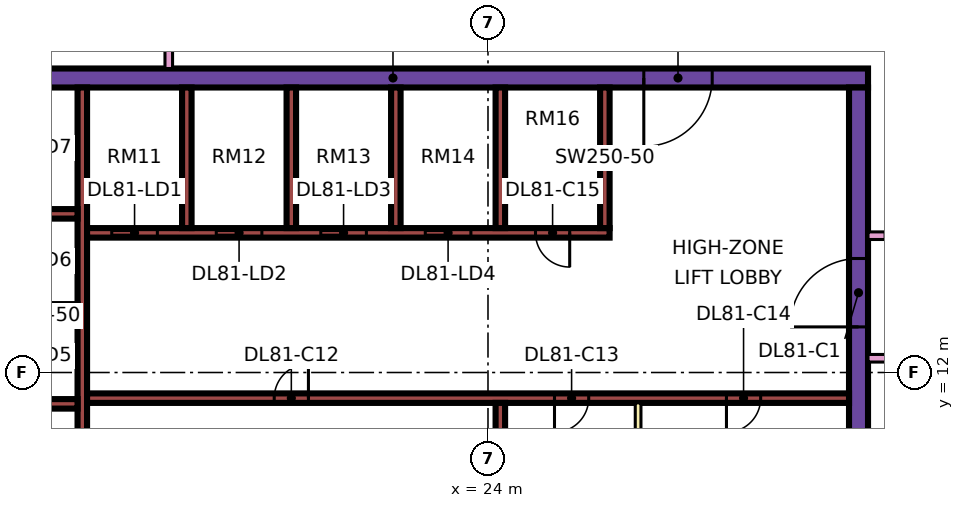
"""IFC4 building model, lengths in metres.
Left out: names, types, materials, properties, quantities, classifications, styles, units other than length and angle.
Written with IfcOpenShell. Run it as: python <this file> out.ifc"""

import sys

from ifc_helpers import new_model, si_unit, direction, frame, frame_2d, origin, place, context, subcontext, project, spatial, rectangle, extrude, element, fill, save


model = new_model("IFC4")
c1 = context("Model", 3, precision=1e-05, world=origin(), true_north=direction((0.0, 1.0)))
c2 = subcontext(c1, "Body", "Model", "MODEL_VIEW")
j1 = project(units=[si_unit("LENGTHUNIT", "METRE"), si_unit("PLANEANGLEUNIT", "RADIAN")], contexts=[c1])
p1 = place(None, origin())
s1 = spatial("IfcSite", under=j1, at=p1, CompositionType="ELEMENT")
p2 = place(p1, origin())
s2 = spatial("IfcBuilding", under=s1, at=p2, CompositionType="ELEMENT")
p3 = place(p2, frame((0.0, 0.0, 350.15)))
s3 = spatial("IfcBuildingStorey", under=s2, at=p3, CompositionType="ELEMENT", Elevation=350.15)
p4 = place(p3, frame((9.0, 19.75, 0.0), z_axis=(0.0, 0.0, 1.0), x_axis=(1.0, 0.0, 0.0)))
e1 = element("IfcWall", 1, at=p4, inside=s3, PredefinedType="SHEAR", context=c2, shape_type="SweptSolid", body=[
    extrude(rectangle(XDim=25.0, YDim=0.5, at=frame_2d((12.5, 0.0))), origin(), (0.0, 0.0, 1.0), 3.75),
])
p5 = place(p4, frame((19.1, 0.0, 0.0)))
e2 = element("IfcOpeningElement", 2, at=p5, cuts=e1, PredefinedType="OPENING", context=c2, shape_type="SweptSolid", body=[
    extrude(rectangle(XDim=1.8, YDim=2.4, at=frame_2d((0.9, 1.2))), frame((0.0, 0.26, 0.0), z_axis=(0.0, -1.0, 0.0), x_axis=(1.0, 0.0, 0.0)), (0.0, 0.0, 1.0), 0.52),
])
p6 = place(p3, frame((33.75, 7.5, 0.0), z_axis=(0.0, 0.0, 1.0), x_axis=(0.0, 1.0, 0.0)))
e3 = element("IfcWall", 3, at=p6, inside=s3, PredefinedType="SHEAR", context=c2, shape_type="SweptSolid", body=[
    extrude(rectangle(XDim=12.0, YDim=0.5, at=frame_2d((6.0, 0.0))), origin(), (0.0, 0.0, 1.0), 3.75),
])
p7 = place(p6, frame((5.7, 0.0, 0.0)))
e4 = element("IfcOpeningElement", 4, at=p7, cuts=e3, PredefinedType="OPENING", context=c2, shape_type="SweptSolid", body=[
    extrude(rectangle(XDim=1.8, YDim=2.4, at=frame_2d((0.9, 1.2))), frame((0.0, 0.26, 0.0), z_axis=(0.0, -1.0, 0.0), x_axis=(1.0, 0.0, 0.0)), (0.0, 0.0, 1.0), 0.52),
])
p8 = place(p3, frame((13.325, 7.5, 0.0), z_axis=(0.0, 0.0, 1.0), x_axis=(0.0, 1.0, 0.0)))
e5 = element("IfcWall", 5, at=p8, inside=s3, PredefinedType="SHEAR", context=c2, shape_type="SweptSolid", body=[
    extrude(rectangle(XDim=12.0, YDim=0.25, at=frame_2d((6.0, 0.0))), origin(), (0.0, 0.0, 1.0), 3.75),
])
p9 = place(p3, frame((13.45, 11.325, 0.0), z_axis=(0.0, 0.0, 1.0), x_axis=(1.0, 0.0, 0.0)))
e6 = element("IfcWall", 6, at=p9, inside=s3, PredefinedType="SHEAR", context=c2, shape_type="SweptSolid", body=[
    extrude(rectangle(XDim=20.05, YDim=0.25, at=frame_2d((10.025, 0.0))), origin(), (0.0, 0.0, 1.0), 3.75),
])
p10 = place(p9, frame((4.925, 0.0, 0.0)))
e7 = element("IfcOpeningElement", 7, at=p10, cuts=e6, PredefinedType="OPENING", context=c2, shape_type="SweptSolid", body=[
    extrude(rectangle(XDim=0.9, YDim=2.1, at=frame_2d((0.45, 1.05))), frame((0.0, 0.135, 0.0), z_axis=(0.0, -1.0, 0.0), x_axis=(1.0, 0.0, 0.0)), (0.0, 0.0, 1.0), 0.27),
])
p11 = place(p9, frame((12.3, 0.0, 0.0)))
e8 = element("IfcOpeningElement", 8, at=p11, cuts=e6, PredefinedType="OPENING", context=c2, shape_type="SweptSolid", body=[
    extrude(rectangle(XDim=0.9, YDim=2.1, at=frame_2d((0.45, 1.05))), frame((0.0, 0.135, 0.0), z_axis=(0.0, -1.0, 0.0), x_axis=(1.0, 0.0, 0.0)), (0.0, 0.0, 1.0), 0.27),
])
p12 = place(p9, frame((16.825, 0.0, 0.0)))
e9 = element("IfcOpeningElement", 9, at=p12, cuts=e6, PredefinedType="OPENING", context=c2, shape_type="SweptSolid", body=[
    extrude(rectangle(XDim=0.9, YDim=2.1, at=frame_2d((0.45, 1.05))), frame((0.0, 0.135, 0.0), z_axis=(0.0, -1.0, 0.0), x_axis=(1.0, 0.0, 0.0)), (0.0, 0.0, 1.0), 0.27),
])
p13 = place(p3, frame((13.45, 15.675, 0.0), z_axis=(0.0, 0.0, 1.0), x_axis=(1.0, 0.0, 0.0)))
e10 = element("IfcWall", 10, at=p13, inside=s3, PredefinedType="SHEAR", context=c2, shape_type="SweptSolid", body=[
    extrude(rectangle(XDim=13.75, YDim=0.25, at=frame_2d((6.875, 0.0))), origin(), (0.0, 0.0, 1.0), 3.75),
])
p14 = place(p13, frame((0.65, 0.0, 0.0)))
e11 = element("IfcOpeningElement", 11, at=p14, cuts=e10, PredefinedType="OPENING", context=c2, shape_type="SweptSolid", body=[
    extrude(rectangle(XDim=1.2, YDim=2.2, at=frame_2d((0.6, 1.1))), frame((0.0, 0.135, 0.0), z_axis=(0.0, -1.0, 0.0), x_axis=(1.0, 0.0, 0.0)), (0.0, 0.0, 1.0), 0.27),
])
p15 = place(p13, frame((3.4, 0.0, 0.0)))
e12 = element("IfcOpeningElement", 12, at=p15, cuts=e10, PredefinedType="OPENING", context=c2, shape_type="SweptSolid", body=[
    extrude(rectangle(XDim=1.2, YDim=2.2, at=frame_2d((0.6, 1.1))), frame((0.0, 0.135, 0.0), z_axis=(0.0, -1.0, 0.0), x_axis=(1.0, 0.0, 0.0)), (0.0, 0.0, 1.0), 0.27),
])
p16 = place(p13, frame((6.15, 0.0, 0.0)))
e13 = element("IfcOpeningElement", 13, at=p16, cuts=e10, PredefinedType="OPENING", context=c2, shape_type="SweptSolid", body=[
    extrude(rectangle(XDim=1.2, YDim=2.2, at=frame_2d((0.6, 1.1))), frame((0.0, 0.135, 0.0), z_axis=(0.0, -1.0, 0.0), x_axis=(1.0, 0.0, 0.0)), (0.0, 0.0, 1.0), 0.27),
])
p17 = place(p13, frame((8.9, 0.0, 0.0)))
e14 = element("IfcOpeningElement", 14, at=p17, cuts=e10, PredefinedType="OPENING", context=c2, shape_type="SweptSolid", body=[
    extrude(rectangle(XDim=1.2, YDim=2.2, at=frame_2d((0.6, 1.1))), frame((0.0, 0.135, 0.0), z_axis=(0.0, -1.0, 0.0), x_axis=(1.0, 0.0, 0.0)), (0.0, 0.0, 1.0), 0.27),
])
p18 = place(p13, frame((11.8, 0.0, 0.0)))
e15 = element("IfcOpeningElement", 15, at=p18, cuts=e10, PredefinedType="OPENING", context=c2, shape_type="SweptSolid", body=[
    extrude(rectangle(XDim=0.9, YDim=2.1, at=frame_2d((0.45, 1.05))), frame((0.0, 0.135, 0.0), z_axis=(0.0, -1.0, 0.0), x_axis=(1.0, 0.0, 0.0)), (0.0, 0.0, 1.0), 0.27),
])
for number, where, z_axis, x_axis in (
    (16, (10.2, 11.175, 0.0), (0.0, 0.0, 1.0), (1.0, 0.0, 0.0)),
    (17, (10.2, 13.675, 0.0), (0.0, 0.0, 1.0), (1.0, 0.0, 0.0)),
    (18, (10.2, 16.175, 0.0), (0.0, 0.0, 1.0), (1.0, 0.0, 0.0)),
):
    element("IfcWall", number, at=place(p3, frame(where, z_axis=z_axis, x_axis=x_axis)), inside=s3, PredefinedType="SHEAR", context=c2, shape_type="SweptSolid", body=[
        extrude(rectangle(XDim=3.0, YDim=0.25, at=frame_2d((1.5, 0.0))), origin(), (0.0, 0.0, 1.0), 3.75),
    ])
for number, where, z_axis, x_axis in (
    (19, (24.325, 7.5, 0.0), (0.0, 0.0, 1.0), (0.0, 1.0, 0.0)),
    (20, (16.075, 15.8, 0.0), (0.0, 0.0, 1.0), (0.0, 1.0, 0.0)),
    (21, (18.825, 15.8, 0.0), (0.0, 0.0, 1.0), (0.0, 1.0, 0.0)),
    (22, (21.575, 15.8, 0.0), (0.0, 0.0, 1.0), (0.0, 1.0, 0.0)),
    (23, (24.325, 15.8, 0.0), (0.0, 0.0, 1.0), (0.0, 1.0, 0.0)),
    (24, (27.075, 15.8, 0.0), (0.0, 0.0, 1.0), (0.0, 1.0, 0.0)),
):
    element("IfcWall", number, at=place(p3, frame(where, z_axis=z_axis, x_axis=x_axis)), inside=s3, PredefinedType="SHEAR", context=c2, shape_type="SweptSolid", body=[
        extrude(rectangle(XDim=3.7, YDim=0.25, at=frame_2d((1.85, 0.0))), origin(), (0.0, 0.0, 1.0), 3.75),
    ])
p19 = place(p3, frame((-1.447, 12.553, 0.0), z_axis=(0.0, 0.0, 1.0), x_axis=(0.707106781187, -0.707106781187, 0.0)))
e25 = element("IfcWall", 25, at=p19, inside=s3, PredefinedType="SOLIDWALL", context=c2, shape_type="SweptSolid", body=[
    extrude(rectangle(XDim=19.799, YDim=0.15, at=frame_2d((9.899, 0.0))), origin(), (0.0, 0.0, 1.0), 3.35),
])
p20 = place(p19, frame((2.212, 0.0, 0.45)))
e26 = element("IfcOpeningElement", 26, at=p20, cuts=e25, PredefinedType="OPENING", context=c2, shape_type="SweptSolid", body=[
    extrude(rectangle(XDim=3.0, YDim=2.4, at=frame_2d((1.5, 1.2))), frame((0.0, 0.085, 0.0), z_axis=(0.0, -1.0, 0.0), x_axis=(1.0, 0.0, 0.0)), (0.0, 0.0, 1.0), 0.17),
])
p21 = place(p19, frame((10.216, 0.0, 0.45)))
e27 = element("IfcOpeningElement", 27, at=p21, cuts=e25, PredefinedType="OPENING", context=c2, shape_type="SweptSolid", body=[
    extrude(rectangle(XDim=3.0, YDim=2.4, at=frame_2d((1.5, 1.2))), frame((0.0, 0.085, 0.0), z_axis=(0.0, -1.0, 0.0), x_axis=(1.0, 0.0, 0.0)), (0.0, 0.0, 1.0), 0.17),
])
p22 = place(p3, frame((27.95, 7.5, 0.0), z_axis=(0.0, 0.0, 1.0), x_axis=(0.0, 1.0, 0.0)))
e28 = element("IfcWall", 28, at=p22, inside=s3, PredefinedType="PARTITIONING", context=c2, shape_type="SweptSolid", body=[
    extrude(rectangle(XDim=3.7, YDim=0.15, at=frame_2d((1.85, 0.0))), origin(), (0.0, 0.0, 1.0), 3.35),
])
p23 = place(p3, frame((15.6, 20.0, 0.0), z_axis=(0.0, 0.0, 1.0), x_axis=(0.0, 1.0, 0.0)))
e29 = element("IfcWall", 29, at=p23, inside=s3, PredefinedType="PARTITIONING", context=c2, shape_type="SweptSolid", body=[
    extrude(rectangle(XDim=27.775, YDim=0.2, at=frame_2d((13.887, 0.0))), origin(), (0.0, 0.0, 1.0), 3.35),
])
p24 = place(p23, frame((6.7, 0.0, 0.0)))
e30 = element("IfcOpeningElement", 30, at=p24, cuts=e29, PredefinedType="OPENING", context=c2, shape_type="SweptSolid", body=[
    extrude(rectangle(XDim=1.6, YDim=2.1, at=frame_2d((0.8, 1.05))), frame((0.0, 0.11, 0.0), z_axis=(0.0, -1.0, 0.0), x_axis=(1.0, 0.0, 0.0)), (0.0, 0.0, 1.0), 0.22),
])
p25 = place(p23, frame((12.95, 0.0, 0.0)))
e31 = element("IfcOpeningElement", 31, at=p25, cuts=e29, PredefinedType="OPENING", context=c2, shape_type="SweptSolid", body=[
    extrude(rectangle(XDim=1.0, YDim=2.1, at=frame_2d((0.5, 1.05))), frame((0.0, 0.11, 0.0), z_axis=(0.0, -1.0, 0.0), x_axis=(1.0, 0.0, 0.0)), (0.0, 0.0, 1.0), 0.22),
])
p26 = place(p23, frame((16.9, 0.0, 0.0)))
e32 = element("IfcOpeningElement", 32, at=p26, cuts=e29, PredefinedType="OPENING", context=c2, shape_type="SweptSolid", body=[
    extrude(rectangle(XDim=1.0, YDim=2.1, at=frame_2d((0.5, 1.05))), frame((0.0, 0.11, 0.0), z_axis=(0.0, -1.0, 0.0), x_axis=(1.0, 0.0, 0.0)), (0.0, 0.0, 1.0), 0.22),
])
p27 = place(p23, frame((1.15, 0.0, 0.0)))
e33 = element("IfcOpeningElement", 33, at=p27, cuts=e29, PredefinedType="OPENING", context=c2, shape_type="SweptSolid", body=[
    extrude(rectangle(XDim=1.8, YDim=2.1, at=frame_2d((0.9, 1.05))), frame((0.0, 0.11, 0.0), z_axis=(0.0, -1.0, 0.0), x_axis=(1.0, 0.0, 0.0)), (0.0, 0.0, 1.0), 0.22),
])
p28 = place(p23, frame((25.9, 0.0, 0.0)))
e34 = element("IfcOpeningElement", 34, at=p28, cuts=e29, PredefinedType="OPENING", context=c2, shape_type="SweptSolid", body=[
    extrude(rectangle(XDim=1.0, YDim=2.1, at=frame_2d((0.5, 1.05))), frame((0.0, 0.11, 0.0), z_axis=(0.0, -1.0, 0.0), x_axis=(1.0, 0.0, 0.0)), (0.0, 0.0, 1.0), 0.22),
])
p29 = place(p3, frame((34.0, 12.375, 0.0), z_axis=(0.0, 0.0, 1.0), x_axis=(1.0, 0.0, 0.0)))
e35 = element("IfcWall", 35, at=p29, inside=s3, PredefinedType="PARTITIONING", context=c2, shape_type="SweptSolid", body=[
    extrude(rectangle(XDim=2.376, YDim=0.2, at=frame_2d((1.188, 0.0))), origin(), (0.0, 0.0, 1.0), 3.35),
])
p30 = place(p3, frame((34.0, 15.6, 0.0), z_axis=(0.0, 0.0, 1.0), x_axis=(1.0, 0.0, 0.0)))
e36 = element("IfcWall", 36, at=p30, inside=s3, PredefinedType="PARTITIONING", context=c2, shape_type="SweptSolid", body=[
    extrude(rectangle(XDim=10.35, YDim=0.2, at=frame_2d((5.175, 0.0))), origin(), (0.0, 0.0, 1.0), 3.35),
])
p31 = place(p30, frame((5.6, 0.0, 0.0)))
e37 = element("IfcOpeningElement", 37, at=p31, cuts=e36, PredefinedType="OPENING", context=c2, shape_type="SweptSolid", body=[
    extrude(rectangle(XDim=1.0, YDim=2.1, at=frame_2d((0.5, 1.05))), frame((0.0, 0.11, 0.0), z_axis=(0.0, -1.0, 0.0), x_axis=(1.0, 0.0, 0.0)), (0.0, 0.0, 1.0), 0.22),
])
p32 = place(p30, frame((0.45, 0.0, 0.0)))
e38 = element("IfcOpeningElement", 38, at=p32, cuts=e36, PredefinedType="OPENING", context=c2, shape_type="SweptSolid", body=[
    extrude(rectangle(XDim=1.2, YDim=2.1, at=frame_2d((0.6, 1.05))), frame((0.0, 0.11, 0.0), z_axis=(0.0, -1.0, 0.0), x_axis=(1.0, 0.0, 0.0)), (0.0, 0.0, 1.0), 0.22),
])
p33 = place(p14, origin())
e39 = element("IfcDoor", 39, at=p33, inside=s3, OperationType="DOUBLE_DOOR_SLIDING", PredefinedType="DOOR", context=c2, shape_type="SweptSolid", body=[
    extrude(rectangle(XDim=1.2, YDim=2.2, at=frame_2d((0.6, 1.1))), frame((0.0, 0.025, 0.0), z_axis=(0.0, -1.0, 0.0), x_axis=(1.0, 0.0, 0.0)), (0.0, 0.0, 1.0), 0.05),
])
fill(e11, e39)
p34 = place(p15, origin())
e40 = element("IfcDoor", 40, at=p34, inside=s3, OperationType="DOUBLE_DOOR_SLIDING", PredefinedType="DOOR", context=c2, shape_type="SweptSolid", body=[
    extrude(rectangle(XDim=1.2, YDim=2.2, at=frame_2d((0.6, 1.1))), frame((0.0, 0.025, 0.0), z_axis=(0.0, -1.0, 0.0), x_axis=(1.0, 0.0, 0.0)), (0.0, 0.0, 1.0), 0.05),
])
fill(e12, e40)
p35 = place(p16, origin())
e41 = element("IfcDoor", 41, at=p35, inside=s3, OperationType="DOUBLE_DOOR_SLIDING", PredefinedType="DOOR", context=c2, shape_type="SweptSolid", body=[
    extrude(rectangle(XDim=1.2, YDim=2.2, at=frame_2d((0.6, 1.1))), frame((0.0, 0.025, 0.0), z_axis=(0.0, -1.0, 0.0), x_axis=(1.0, 0.0, 0.0)), (0.0, 0.0, 1.0), 0.05),
])
fill(e13, e41)
p36 = place(p17, origin())
e42 = element("IfcDoor", 42, at=p36, inside=s3, OperationType="DOUBLE_DOOR_SLIDING", PredefinedType="DOOR", context=c2, shape_type="SweptSolid", body=[
    extrude(rectangle(XDim=1.2, YDim=2.2, at=frame_2d((0.6, 1.1))), frame((0.0, 0.025, 0.0), z_axis=(0.0, -1.0, 0.0), x_axis=(1.0, 0.0, 0.0)), (0.0, 0.0, 1.0), 0.05),
])
fill(e14, e42)
p37 = place(p7, origin())
e43 = element("IfcDoor", 43, at=p37, inside=s3, OperationType="DOUBLE_DOOR_SINGLE_SWING", PredefinedType="DOOR", context=c2, shape_type="SweptSolid", body=[
    extrude(rectangle(XDim=1.8, YDim=2.4, at=frame_2d((0.9, 1.2))), frame((0.0, 0.025, 0.0), z_axis=(0.0, -1.0, 0.0), x_axis=(1.0, 0.0, 0.0)), (0.0, 0.0, 1.0), 0.05),
])
fill(e4, e43)
p38 = place(p5, frame((1.8, 0.0, 0.0), z_axis=(0.0, 0.0, 1.0), x_axis=(-1.0, 0.0, 0.0)))
e44 = element("IfcDoor", 44, at=p38, inside=s3, OperationType="DOUBLE_DOOR_SINGLE_SWING", PredefinedType="DOOR", context=c2, shape_type="SweptSolid", body=[
    extrude(rectangle(XDim=1.8, YDim=2.4, at=frame_2d((0.9, 1.2))), frame((0.0, 0.025, 0.0), z_axis=(0.0, -1.0, 0.0), x_axis=(1.0, 0.0, 0.0)), (0.0, 0.0, 1.0), 0.05),
])
fill(e2, e44)
p39 = place(p10, frame((0.9, 0.0, 0.0), z_axis=(0.0, 0.0, 1.0), x_axis=(-1.0, 0.0, 0.0)))
e45 = element("IfcDoor", 45, at=p39, inside=s3, OperationType="SINGLE_SWING_RIGHT", PredefinedType="DOOR", context=c2, shape_type="SweptSolid", body=[
    extrude(rectangle(XDim=0.9, YDim=2.1, at=frame_2d((0.45, 1.05))), frame((0.0, 0.025, 0.0), z_axis=(0.0, -1.0, 0.0), x_axis=(1.0, 0.0, 0.0)), (0.0, 0.0, 1.0), 0.05),
])
fill(e7, e45)
p40 = place(p11, frame((0.9, 0.0, 0.0), z_axis=(0.0, 0.0, 1.0), x_axis=(-1.0, 0.0, 0.0)))
e46 = element("IfcDoor", 46, at=p40, inside=s3, OperationType="SINGLE_SWING_LEFT", PredefinedType="DOOR", context=c2, shape_type="SweptSolid", body=[
    extrude(rectangle(XDim=0.9, YDim=2.1, at=frame_2d((0.45, 1.05))), frame((0.0, 0.025, 0.0), z_axis=(0.0, -1.0, 0.0), x_axis=(1.0, 0.0, 0.0)), (0.0, 0.0, 1.0), 0.05),
])
fill(e8, e46)
p41 = place(p12, frame((0.9, 0.0, 0.0), z_axis=(0.0, 0.0, 1.0), x_axis=(-1.0, 0.0, 0.0)))
e47 = element("IfcDoor", 47, at=p41, inside=s3, OperationType="SINGLE_SWING_LEFT", PredefinedType="DOOR", context=c2, shape_type="SweptSolid", body=[
    extrude(rectangle(XDim=0.9, YDim=2.1, at=frame_2d((0.45, 1.05))), frame((0.0, 0.025, 0.0), z_axis=(0.0, -1.0, 0.0), x_axis=(1.0, 0.0, 0.0)), (0.0, 0.0, 1.0), 0.05),
])
fill(e9, e47)
p42 = place(p18, origin())
e48 = element("IfcDoor", 48, at=p42, inside=s3, OperationType="SINGLE_SWING_RIGHT", PredefinedType="DOOR", context=c2, shape_type="SweptSolid", body=[
    extrude(rectangle(XDim=0.9, YDim=2.1, at=frame_2d((0.45, 1.05))), frame((0.0, 0.025, 0.0), z_axis=(0.0, -1.0, 0.0), x_axis=(1.0, 0.0, 0.0)), (0.0, 0.0, 1.0), 0.05),
])
fill(e15, e48)
save(model, sys.argv[1])
